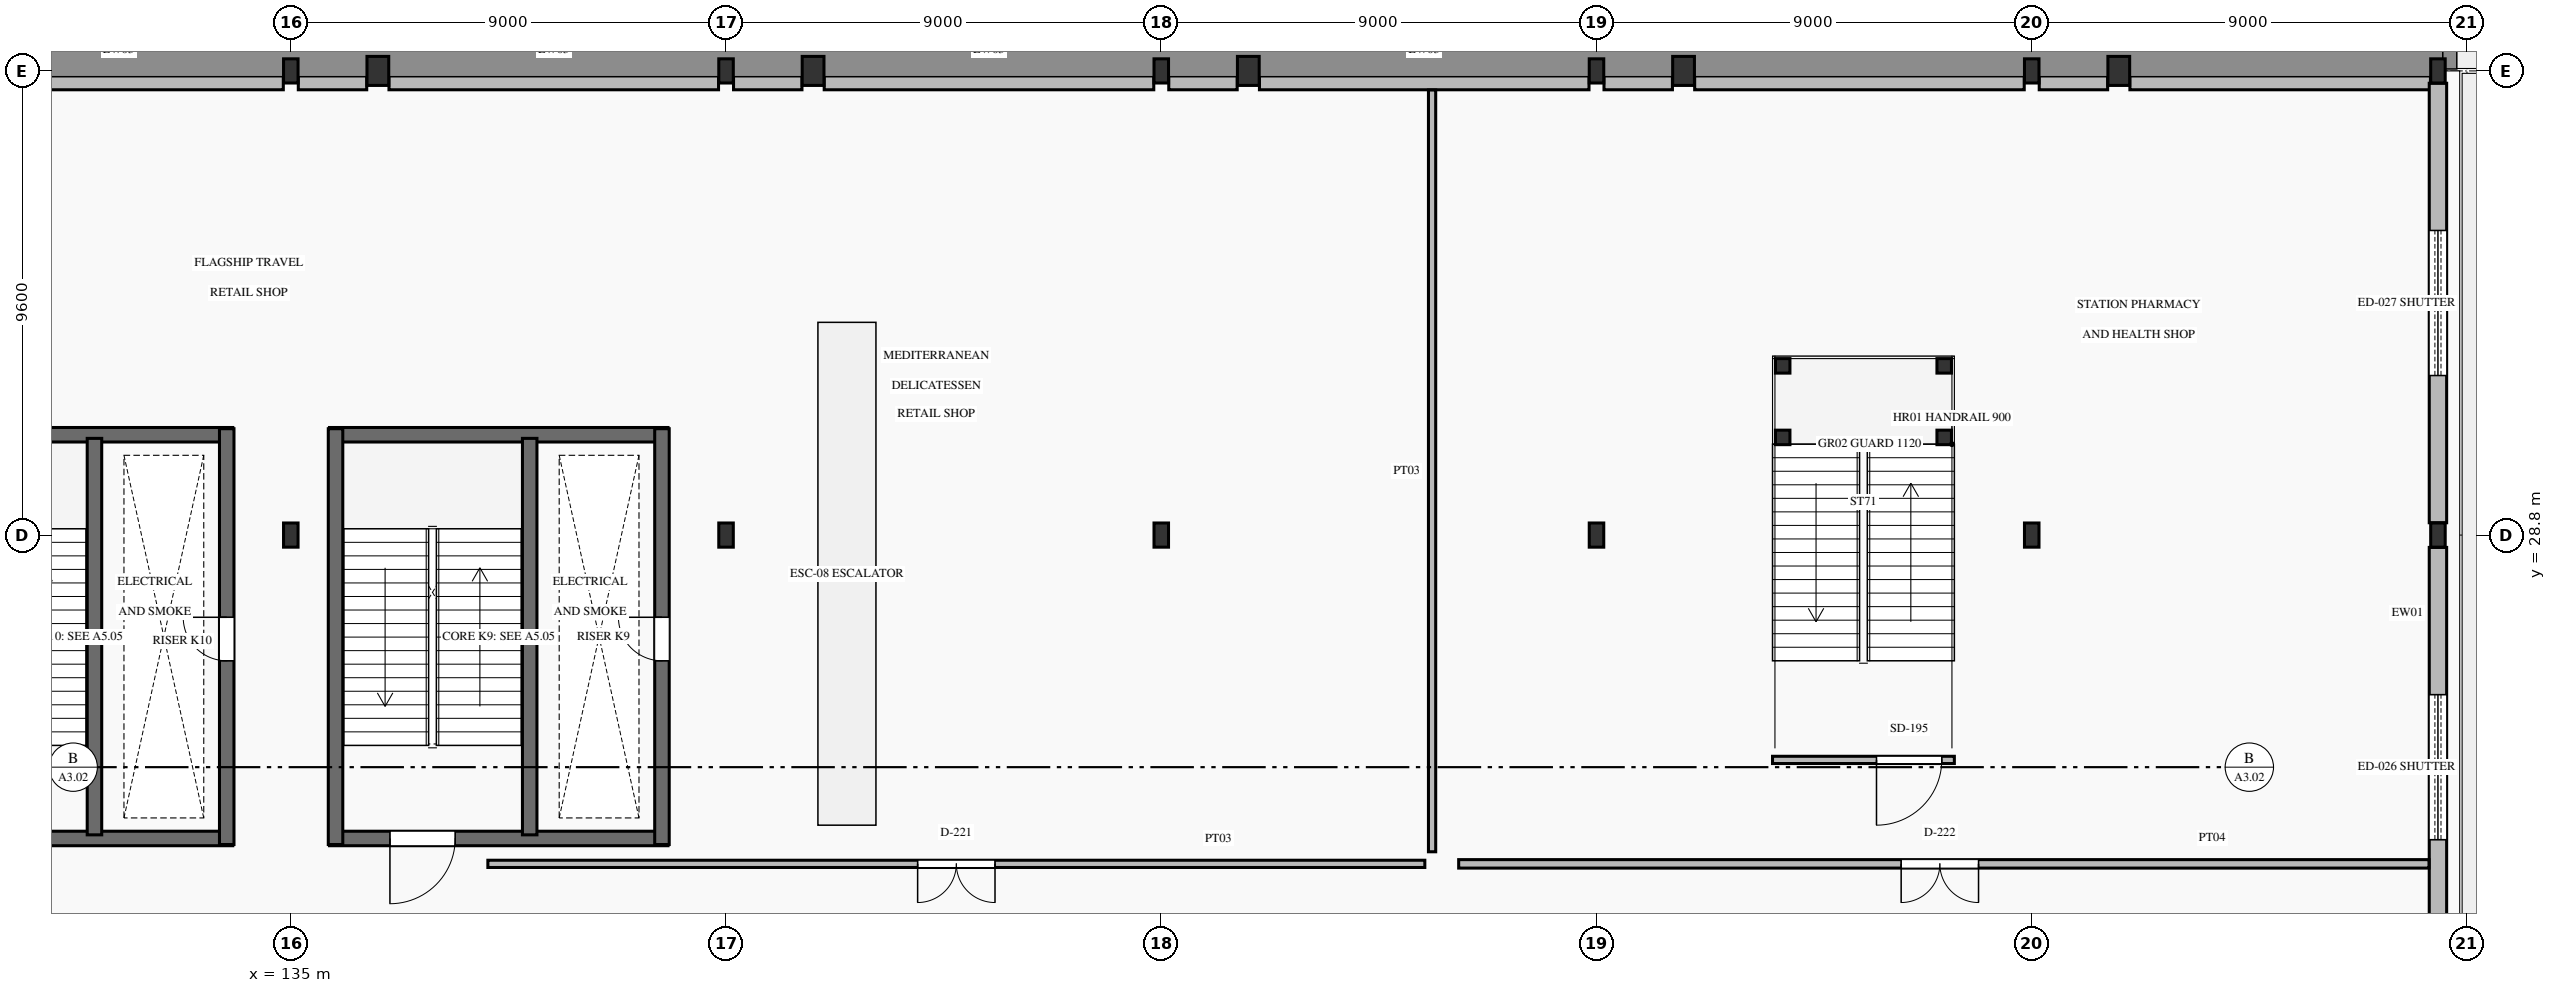
"""IFC4 building model, lengths in metres.
Left out: names, types, materials, properties, quantities, classifications, styles, units other than length and angle.
Written with IfcOpenShell. Run it as: python <this file> out.ifc"""

import sys

from ifc_helpers import new_model, si_unit, direction, frame, frame_2d, origin, origin_2d, place, context, subcontext, project, spatial, rectangle, i_section, extrude, element, fill, save


model = new_model("IFC4")
c1 = context("Model", 3, precision=1e-05, world=origin(), true_north=direction((0.0, 1.0)))
c2 = subcontext(c1, "Body", "Model", "MODEL_VIEW")
j1 = project(units=[si_unit("LENGTHUNIT", "METRE"), si_unit("PLANEANGLEUNIT", "RADIAN")], contexts=[c1])
p1 = place(None, origin())
s1 = spatial("IfcSite", under=j1, at=p1, CompositionType="ELEMENT")
p2 = place(p1, origin())
s2 = spatial("IfcBuilding", under=s1, at=p2, CompositionType="ELEMENT")
p3 = place(p2, origin())
s3 = spatial("IfcBuildingStorey", under=s2, at=p3, CompositionType="ELEMENT", Elevation=0.0)
for number, where, z_axis, x_axis in (
    (1, (135.0, 28.8, 0.0), (0.0, 0.0, 1.0), (1.0, 0.0, 0.0)),
    (2, (135.0, 38.4, 0.0), (0.0, 0.0, 1.0), (1.0, 0.0, 0.0)),
    (3, (144.0, 28.8, 0.0), (0.0, 0.0, 1.0), (1.0, 0.0, 0.0)),
    (4, (144.0, 38.4, 0.0), (0.0, 0.0, 1.0), (1.0, 0.0, 0.0)),
    (5, (153.0, 28.8, 0.0), (0.0, 0.0, 1.0), (1.0, 0.0, 0.0)),
    (6, (153.0, 38.4, 0.0), (0.0, 0.0, 1.0), (1.0, 0.0, 0.0)),
    (7, (162.0, 28.8, 0.0), (0.0, 0.0, 1.0), (1.0, 0.0, 0.0)),
    (8, (162.0, 38.4, 0.0), (0.0, 0.0, 1.0), (1.0, 0.0, 0.0)),
    (9, (171.0, 28.8, 0.0), (0.0, 0.0, 1.0), (1.0, 0.0, 0.0)),
    (10, (171.0, 38.4, 0.0), (0.0, 0.0, 1.0), (1.0, 0.0, 0.0)),
    (11, (179.4, 28.8, 0.0), (0.0, 0.0, 1.0), (1.0, 0.0, 0.0)),
    (12, (179.4, 38.4, 0.0), (0.0, 0.0, 1.0), (1.0, 0.0, 0.0)),
):
    element("IfcColumn", number, at=place(p3, frame(where, z_axis=z_axis, x_axis=x_axis)), inside=s3, PredefinedType="COLUMN", context=c2, shape_type="SweptSolid", body=[
        extrude(i_section(OverallWidth=0.3, OverallDepth=0.5, WebThickness=0.014, FlangeThickness=0.028, FilletRadius=0.027, at=origin_2d()), origin(), (0.0, 0.0, 1.0), 6.0),
    ])
for number, where, z_axis, x_axis in (
    (13, (136.8, 38.4, 0.0), (0.0, 0.0, 1.0), (1.0, 0.0, 0.0)),
    (14, (145.8, 38.4, 0.0), (0.0, 0.0, 1.0), (1.0, 0.0, 0.0)),
    (15, (154.8, 38.4, 0.0), (0.0, 0.0, 1.0), (1.0, 0.0, 0.0)),
    (16, (163.8, 38.4, 0.0), (0.0, 0.0, 1.0), (1.0, 0.0, 0.0)),
    (17, (172.8, 38.4, 0.0), (0.0, 0.0, 1.0), (1.0, 0.0, 0.0)),
):
    element("IfcColumn", number, at=place(p3, frame(where, z_axis=z_axis, x_axis=x_axis)), inside=s3, PredefinedType="PILASTER", context=c2, shape_type="SweptSolid", body=[
        extrude(rectangle(XDim=0.45, YDim=0.6, at=origin_2d()), origin(), (0.0, 0.0, 1.0), 6.0),
    ])
p4 = place(p3, frame((128.03, 38.2, 0.0), z_axis=(0.0, 0.0, 1.0), x_axis=(1.0, 0.0, 0.0)))
e18 = element("IfcWall", 18, at=p4, inside=s3, PredefinedType="SOLIDWALL", context=c2, shape_type="SweptSolid", body=[
    extrude(rectangle(XDim=6.815, YDim=0.38, at=frame_2d((3.407, 0.0))), origin(), (0.0, 0.0, 1.0), 5.49),
])
p5 = place(p3, frame((135.155, 38.2, 0.0), z_axis=(0.0, 0.0, 1.0), x_axis=(1.0, 0.0, 0.0)))
e19 = element("IfcWall", 19, at=p5, inside=s3, PredefinedType="SOLIDWALL", context=c2, shape_type="SweptSolid", body=[
    extrude(rectangle(XDim=1.415, YDim=0.38, at=frame_2d((0.708, 0.0))), origin(), (0.0, 0.0, 1.0), 5.49),
])
p6 = place(p3, frame((137.03, 38.2, 0.0), z_axis=(0.0, 0.0, 1.0), x_axis=(1.0, 0.0, 0.0)))
e20 = element("IfcWall", 20, at=p6, inside=s3, PredefinedType="SOLIDWALL", context=c2, shape_type="SweptSolid", body=[
    extrude(rectangle(XDim=6.815, YDim=0.38, at=frame_2d((3.407, 0.0))), origin(), (0.0, 0.0, 1.0), 5.49),
])
p7 = place(p3, frame((144.155, 38.2, 0.0), z_axis=(0.0, 0.0, 1.0), x_axis=(1.0, 0.0, 0.0)))
e21 = element("IfcWall", 21, at=p7, inside=s3, PredefinedType="SOLIDWALL", context=c2, shape_type="SweptSolid", body=[
    extrude(rectangle(XDim=1.415, YDim=0.38, at=frame_2d((0.708, 0.0))), origin(), (0.0, 0.0, 1.0), 5.49),
])
p8 = place(p3, frame((146.03, 38.2, 0.0), z_axis=(0.0, 0.0, 1.0), x_axis=(1.0, 0.0, 0.0)))
e22 = element("IfcWall", 22, at=p8, inside=s3, PredefinedType="SOLIDWALL", context=c2, shape_type="SweptSolid", body=[
    extrude(rectangle(XDim=6.815, YDim=0.38, at=frame_2d((3.407, 0.0))), origin(), (0.0, 0.0, 1.0), 5.49),
])
p9 = place(p3, frame((153.155, 38.2, 0.0), z_axis=(0.0, 0.0, 1.0), x_axis=(1.0, 0.0, 0.0)))
e23 = element("IfcWall", 23, at=p9, inside=s3, PredefinedType="SOLIDWALL", context=c2, shape_type="SweptSolid", body=[
    extrude(rectangle(XDim=1.415, YDim=0.38, at=frame_2d((0.708, 0.0))), origin(), (0.0, 0.0, 1.0), 5.49),
])
p10 = place(p3, frame((155.03, 38.2, 0.0), z_axis=(0.0, 0.0, 1.0), x_axis=(1.0, 0.0, 0.0)))
e24 = element("IfcWall", 24, at=p10, inside=s3, PredefinedType="SOLIDWALL", context=c2, shape_type="SweptSolid", body=[
    extrude(rectangle(XDim=6.815, YDim=0.38, at=frame_2d((3.407, 0.0))), origin(), (0.0, 0.0, 1.0), 5.49),
])
p11 = place(p3, frame((162.155, 38.2, 0.0), z_axis=(0.0, 0.0, 1.0), x_axis=(1.0, 0.0, 0.0)))
e25 = element("IfcWall", 25, at=p11, inside=s3, PredefinedType="SOLIDWALL", context=c2, shape_type="SweptSolid", body=[
    extrude(rectangle(XDim=1.415, YDim=0.38, at=frame_2d((0.708, 0.0))), origin(), (0.0, 0.0, 1.0), 5.49),
])
p12 = place(p3, frame((164.03, 38.2, 0.0), z_axis=(0.0, 0.0, 1.0), x_axis=(1.0, 0.0, 0.0)))
e26 = element("IfcWall", 26, at=p12, inside=s3, PredefinedType="SOLIDWALL", context=c2, shape_type="SweptSolid", body=[
    extrude(rectangle(XDim=6.815, YDim=0.38, at=frame_2d((3.407, 0.0))), origin(), (0.0, 0.0, 1.0), 5.49),
])
p13 = place(p3, frame((171.155, 38.2, 0.0), z_axis=(0.0, 0.0, 1.0), x_axis=(1.0, 0.0, 0.0)))
e27 = element("IfcWall", 27, at=p13, inside=s3, PredefinedType="SOLIDWALL", context=c2, shape_type="SweptSolid", body=[
    extrude(rectangle(XDim=1.415, YDim=0.38, at=frame_2d((0.708, 0.0))), origin(), (0.0, 0.0, 1.0), 5.49),
])
p14 = place(p3, frame((173.03, 38.2, 0.0), z_axis=(0.0, 0.0, 1.0), x_axis=(1.0, 0.0, 0.0)))
e28 = element("IfcWall", 28, at=p14, inside=s3, PredefinedType="SOLIDWALL", context=c2, shape_type="SweptSolid", body=[
    extrude(rectangle(XDim=6.215, YDim=0.38, at=frame_2d((3.107, 0.0))), origin(), (0.0, 0.0, 1.0), 5.49),
])
p15 = place(p3, frame((179.4, 19.455, 0.0), z_axis=(0.0, 0.0, 1.0), x_axis=(0.0, 1.0, 0.0)))
e29 = element("IfcWall", 29, at=p15, inside=s3, PredefinedType="SOLIDWALL", context=c2, shape_type="SweptSolid", body=[
    extrude(rectangle(XDim=9.09, YDim=0.36, at=frame_2d((4.545, 0.0))), origin(), (0.0, 0.0, 1.0), 5.48),
])
p16 = place(p15, frame((3.045, 0.0, 0.0)))
e30 = element("IfcOpeningElement", 30, at=p16, cuts=e29, PredefinedType="OPENING", context=c2, shape_type="SweptSolid", body=[
    extrude(rectangle(XDim=3.0, YDim=2.8, at=frame_2d((1.5, 1.4))), frame((0.0, 0.195, 0.0), z_axis=(0.0, -1.0, 0.0), x_axis=(1.0, 0.0, 0.0)), (0.0, 0.0, 1.0), 0.39),
])
p17 = place(p3, frame((179.4, 29.055, 0.0), z_axis=(0.0, 0.0, 1.0), x_axis=(0.0, 1.0, 0.0)))
e31 = element("IfcWall", 31, at=p17, inside=s3, PredefinedType="SOLIDWALL", context=c2, shape_type="SweptSolid", body=[
    extrude(rectangle(XDim=9.09, YDim=0.36, at=frame_2d((4.545, 0.0))), origin(), (0.0, 0.0, 1.0), 5.48),
])
p18 = place(p17, frame((3.045, 0.0, 0.0)))
e32 = element("IfcOpeningElement", 32, at=p18, cuts=e31, PredefinedType="OPENING", context=c2, shape_type="SweptSolid", body=[
    extrude(rectangle(XDim=3.0, YDim=2.8, at=frame_2d((1.5, 1.4))), frame((0.0, 0.195, 0.0), z_axis=(0.0, -1.0, 0.0), x_axis=(1.0, 0.0, 0.0)), (0.0, 0.0, 1.0), 0.39),
])
p19 = place(p3, frame((135.8, 22.525, 0.0), z_axis=(0.0, 0.0, 1.0), x_axis=(1.0, 0.0, 0.0)))
e33 = element("IfcWall", 33, at=p19, inside=s3, PredefinedType="SHEAR", context=c2, shape_type="SweptSolid", body=[
    extrude(rectangle(XDim=7.0, YDim=0.3, at=frame_2d((3.5, 0.0))), origin(), (0.0, 0.0, 1.0), 6.0),
])
p20 = place(p19, frame((1.25, 0.0, 0.0)))
e34 = element("IfcOpeningElement", 34, at=p20, cuts=e33, PredefinedType="OPENING", context=c2, shape_type="SweptSolid", body=[
    extrude(rectangle(XDim=1.35, YDim=2.2, at=frame_2d((0.675, 1.1))), frame((0.0, 0.165, 0.0), z_axis=(0.0, -1.0, 0.0), x_axis=(1.0, 0.0, 0.0)), (0.0, 0.0, 1.0), 0.33),
])
p21 = place(p3, frame((135.8, 30.875, 0.0), z_axis=(0.0, 0.0, 1.0), x_axis=(1.0, 0.0, 0.0)))
e35 = element("IfcWall", 35, at=p21, inside=s3, PredefinedType="SHEAR", context=c2, shape_type="SweptSolid", body=[
    extrude(rectangle(XDim=7.0, YDim=0.3, at=frame_2d((3.5, 0.0))), origin(), (0.0, 0.0, 1.0), 6.0),
])
p22 = place(p3, frame((135.925, 22.4, 0.0), z_axis=(0.0, 0.0, 1.0), x_axis=(0.0, 1.0, 0.0)))
e36 = element("IfcWall", 36, at=p22, inside=s3, PredefinedType="SHEAR", context=c2, shape_type="SweptSolid", body=[
    extrude(rectangle(XDim=8.6, YDim=0.3, at=frame_2d((4.3, 0.0))), origin(), (0.0, 0.0, 1.0), 6.0),
])
p23 = place(p3, frame((142.675, 22.4, 0.0), z_axis=(0.0, 0.0, 1.0), x_axis=(0.0, 1.0, 0.0)))
e37 = element("IfcWall", 37, at=p23, inside=s3, PredefinedType="SHEAR", context=c2, shape_type="SweptSolid", body=[
    extrude(rectangle(XDim=8.6, YDim=0.3, at=frame_2d((4.3, 0.0))), origin(), (0.0, 0.0, 1.0), 6.0),
])
p24 = place(p23, frame((3.8, 0.0, 0.0)))
e38 = element("IfcOpeningElement", 38, at=p24, cuts=e37, PredefinedType="OPENING", context=c2, shape_type="SweptSolid", body=[
    extrude(rectangle(XDim=0.9, YDim=2.05, at=frame_2d((0.45, 1.025))), frame((0.0, 0.165, 0.0), z_axis=(0.0, -1.0, 0.0), x_axis=(1.0, 0.0, 0.0)), (0.0, 0.0, 1.0), 0.33),
])
p25 = place(p3, frame((139.94, 22.6, 0.0), z_axis=(0.0, 0.0, 1.0), x_axis=(0.0, 1.0, 0.0)))
e39 = element("IfcWall", 39, at=p25, inside=s3, PredefinedType="SHEAR", context=c2, shape_type="SweptSolid", body=[
    extrude(rectangle(XDim=8.2, YDim=0.3, at=frame_2d((4.1, 0.0))), origin(), (0.0, 0.0, 1.0), 6.0),
])
p26 = place(p3, frame((126.8, 22.525, 0.0), z_axis=(0.0, 0.0, 1.0), x_axis=(1.0, 0.0, 0.0)))
e40 = element("IfcWall", 40, at=p26, inside=s3, PredefinedType="SHEAR", context=c2, shape_type="SweptSolid", body=[
    extrude(rectangle(XDim=7.0, YDim=0.3, at=frame_2d((3.5, 0.0))), origin(), (0.0, 0.0, 1.0), 6.0),
])
p27 = place(p26, frame((1.25, 0.0, 0.0)))
e41 = element("IfcOpeningElement", 41, at=p27, cuts=e40, PredefinedType="OPENING", context=c2, shape_type="SweptSolid", body=[
    extrude(rectangle(XDim=1.35, YDim=2.2, at=frame_2d((0.675, 1.1))), frame((0.0, 0.165, 0.0), z_axis=(0.0, -1.0, 0.0), x_axis=(1.0, 0.0, 0.0)), (0.0, 0.0, 1.0), 0.33),
])
p28 = place(p3, frame((126.8, 30.875, 0.0), z_axis=(0.0, 0.0, 1.0), x_axis=(1.0, 0.0, 0.0)))
e42 = element("IfcWall", 42, at=p28, inside=s3, PredefinedType="SHEAR", context=c2, shape_type="SweptSolid", body=[
    extrude(rectangle(XDim=7.0, YDim=0.3, at=frame_2d((3.5, 0.0))), origin(), (0.0, 0.0, 1.0), 6.0),
])
p29 = place(p3, frame((133.675, 22.4, 0.0), z_axis=(0.0, 0.0, 1.0), x_axis=(0.0, 1.0, 0.0)))
e43 = element("IfcWall", 43, at=p29, inside=s3, PredefinedType="SHEAR", context=c2, shape_type="SweptSolid", body=[
    extrude(rectangle(XDim=8.6, YDim=0.3, at=frame_2d((4.3, 0.0))), origin(), (0.0, 0.0, 1.0), 6.0),
])
p30 = place(p29, frame((3.8, 0.0, 0.0)))
e44 = element("IfcOpeningElement", 44, at=p30, cuts=e43, PredefinedType="OPENING", context=c2, shape_type="SweptSolid", body=[
    extrude(rectangle(XDim=0.9, YDim=2.05, at=frame_2d((0.45, 1.025))), frame((0.0, 0.165, 0.0), z_axis=(0.0, -1.0, 0.0), x_axis=(1.0, 0.0, 0.0)), (0.0, 0.0, 1.0), 0.33),
])
p31 = place(p3, frame((130.94, 22.6, 0.0), z_axis=(0.0, 0.0, 1.0), x_axis=(0.0, 1.0, 0.0)))
e45 = element("IfcWall", 45, at=p31, inside=s3, PredefinedType="SHEAR", context=c2, shape_type="SweptSolid", body=[
    extrude(rectangle(XDim=8.2, YDim=0.3, at=frame_2d((4.1, 0.0))), origin(), (0.0, 0.0, 1.0), 6.0),
])
for number, where, z_axis, x_axis in (
    (46, (165.85, 32.3, 0.0), (0.0, 0.0, 1.0), (1.0, 0.0, 0.0)),
    (47, (165.85, 30.82, 0.0), (0.0, 0.0, 1.0), (1.0, 0.0, 0.0)),
    (48, (169.19, 32.3, 0.0), (0.0, 0.0, 1.0), (1.0, 0.0, 0.0)),
    (49, (169.19, 30.82, 0.0), (0.0, 0.0, 1.0), (1.0, 0.0, 0.0)),
):
    element("IfcColumn", number, at=place(p3, frame(where, z_axis=z_axis, x_axis=x_axis)), inside=s3, PredefinedType="COLUMN", context=c2, shape_type="SweptSolid", body=[
        extrude(i_section(OverallWidth=0.3, OverallDepth=0.3, WebThickness=0.011, FlangeThickness=0.019, FilletRadius=0.027, at=origin_2d()), origin(), (0.0, 0.0, 1.0), 2.8),
    ])
p32 = place(p3, frame((165.64, 24.15, 0.0), z_axis=(0.0, 0.0, 1.0), x_axis=(1.0, 0.0, 0.0)))
e50 = element("IfcWall", 50, at=p32, inside=s3, PredefinedType="PARTITIONING", context=c2, shape_type="SweptSolid", body=[
    extrude(rectangle(XDim=3.76, YDim=0.15, at=frame_2d((1.88, 0.0))), origin(), (0.0, 0.0, 1.0), 5.53),
])
p33 = place(p32, frame((2.15, 0.0, 0.0)))
e51 = element("IfcOpeningElement", 51, at=p33, cuts=e50, PredefinedType="OPENING", context=c2, shape_type="SweptSolid", body=[
    extrude(rectangle(XDim=1.35, YDim=2.2, at=frame_2d((0.675, 1.1))), frame((0.0, 0.09, 0.0), z_axis=(0.0, -1.0, 0.0), x_axis=(1.0, 0.0, 0.0)), (0.0, 0.0, 1.0), 0.18),
])
p34 = place(p3, frame((139.075, 22.0, 0.0), z_axis=(0.0, 0.0, 1.0), x_axis=(1.0, 0.0, 0.0)))
e52 = element("IfcWall", 52, at=p34, inside=s3, PredefinedType="PARTITIONING", context=c2, shape_type="SweptSolid", body=[
    extrude(rectangle(XDim=19.375, YDim=0.15, at=frame_2d((9.688, 0.0))), origin(), (0.0, 0.0, 1.0), 5.72),
])
p35 = place(p34, frame((8.887, 0.0, 0.0)))
e53 = element("IfcOpeningElement", 53, at=p35, cuts=e52, PredefinedType="OPENING", context=c2, shape_type="SweptSolid", body=[
    extrude(rectangle(XDim=1.6, YDim=2.25, at=frame_2d((0.8, 1.125))), frame((0.0, 0.09, 0.0), z_axis=(0.0, -1.0, 0.0), x_axis=(1.0, 0.0, 0.0)), (0.0, 0.0, 1.0), 0.18),
])
p36 = place(p3, frame((159.15, 22.0, 0.0), z_axis=(0.0, 0.0, 1.0), x_axis=(1.0, 0.0, 0.0)))
e54 = element("IfcWall", 54, at=p36, inside=s3, PredefinedType="PARTITIONING", context=c2, shape_type="SweptSolid", body=[
    extrude(rectangle(XDim=20.065, YDim=0.175, at=frame_2d((10.033, 0.0))), origin(), (0.0, 0.0, 1.0), 5.72),
])
p37 = place(p36, frame((9.15, 0.0, 0.0)))
e55 = element("IfcOpeningElement", 55, at=p37, cuts=e54, PredefinedType="OPENING", context=c2, shape_type="SweptSolid", body=[
    extrude(rectangle(XDim=1.6, YDim=2.25, at=frame_2d((0.8, 1.125))), frame((0.0, 0.103, 0.0), z_axis=(0.0, -1.0, 0.0), x_axis=(1.0, 0.0, 0.0)), (0.0, 0.0, 1.0), 0.205),
])
p38 = place(p3, frame((158.6, 22.25, 0.0), z_axis=(0.0, 0.0, 1.0), x_axis=(0.0, 1.0, 0.0)))
e56 = element("IfcWall", 56, at=p38, inside=s3, PredefinedType="PARTITIONING", context=c2, shape_type="SweptSolid", body=[
    extrude(rectangle(XDim=15.755, YDim=0.15, at=frame_2d((7.877, 0.0))), origin(), (0.0, 0.0, 1.0), 5.72),
])
p39 = place(p16, frame((3.0, 0.0, 0.0), z_axis=(0.0, 0.0, 1.0), x_axis=(-1.0, 0.0, 0.0)))
e57 = element("IfcDoor", 57, at=p39, inside=s3, OperationType="ROLLINGUP", PredefinedType="GATE", context=c2, shape_type="SweptSolid", body=[
    extrude(rectangle(XDim=3.0, YDim=2.8, at=frame_2d((1.5, 1.4))), frame((0.0, 0.025, 0.0), z_axis=(0.0, -1.0, 0.0), x_axis=(1.0, 0.0, 0.0)), (0.0, 0.0, 1.0), 0.05),
])
fill(e30, e57)
p40 = place(p18, frame((3.0, 0.0, 0.0), z_axis=(0.0, 0.0, 1.0), x_axis=(-1.0, 0.0, 0.0)))
e58 = element("IfcDoor", 58, at=p40, inside=s3, OperationType="ROLLINGUP", PredefinedType="GATE", context=c2, shape_type="SweptSolid", body=[
    extrude(rectangle(XDim=3.0, YDim=2.8, at=frame_2d((1.5, 1.4))), frame((0.0, 0.025, 0.0), z_axis=(0.0, -1.0, 0.0), x_axis=(1.0, 0.0, 0.0)), (0.0, 0.0, 1.0), 0.05),
])
fill(e32, e58)
p41 = place(p20, frame((1.35, 0.0, 0.0), z_axis=(0.0, 0.0, 1.0), x_axis=(-1.0, 0.0, 0.0)))
e59 = element("IfcDoor", 59, at=p41, inside=s3, OperationType="SINGLE_SWING_LEFT", PredefinedType="DOOR", context=c2, shape_type="SweptSolid", body=[
    extrude(rectangle(XDim=1.35, YDim=2.2, at=frame_2d((0.675, 1.1))), frame((0.0, 0.025, 0.0), z_axis=(0.0, -1.0, 0.0), x_axis=(1.0, 0.0, 0.0)), (0.0, 0.0, 1.0), 0.05),
])
fill(e34, e59)
p42 = place(p24, origin())
e60 = element("IfcDoor", 60, at=p42, inside=s3, OperationType="SINGLE_SWING_RIGHT", PredefinedType="DOOR", context=c2, shape_type="SweptSolid", body=[
    extrude(rectangle(XDim=0.9, YDim=2.05, at=frame_2d((0.45, 1.025))), frame((0.0, 0.025, 0.0), z_axis=(0.0, -1.0, 0.0), x_axis=(1.0, 0.0, 0.0)), (0.0, 0.0, 1.0), 0.05),
])
fill(e38, e60)
p43 = place(p30, origin())
e61 = element("IfcDoor", 61, at=p43, inside=s3, OperationType="SINGLE_SWING_RIGHT", PredefinedType="DOOR", context=c2, shape_type="SweptSolid", body=[
    extrude(rectangle(XDim=0.9, YDim=2.05, at=frame_2d((0.45, 1.025))), frame((0.0, 0.025, 0.0), z_axis=(0.0, -1.0, 0.0), x_axis=(1.0, 0.0, 0.0)), (0.0, 0.0, 1.0), 0.05),
])
fill(e44, e61)
p44 = place(p33, frame((1.35, 0.0, 0.0), z_axis=(0.0, 0.0, 1.0), x_axis=(-1.0, 0.0, 0.0)))
e62 = element("IfcDoor", 62, at=p44, inside=s3, OperationType="SINGLE_SWING_LEFT", PredefinedType="DOOR", context=c2, shape_type="SweptSolid", body=[
    extrude(rectangle(XDim=1.35, YDim=2.2, at=frame_2d((0.675, 1.1))), frame((0.0, 0.025, 0.0), z_axis=(0.0, -1.0, 0.0), x_axis=(1.0, 0.0, 0.0)), (0.0, 0.0, 1.0), 0.05),
])
fill(e51, e62)
p45 = place(p35, frame((1.6, 0.0, 0.0), z_axis=(0.0, 0.0, 1.0), x_axis=(-1.0, 0.0, 0.0)))
e63 = element("IfcDoor", 63, at=p45, inside=s3, OperationType="DOUBLE_DOOR_SINGLE_SWING", PredefinedType="DOOR", context=c2, shape_type="SweptSolid", body=[
    extrude(rectangle(XDim=1.6, YDim=2.25, at=frame_2d((0.8, 1.125))), frame((0.0, 0.025, 0.0), z_axis=(0.0, -1.0, 0.0), x_axis=(1.0, 0.0, 0.0)), (0.0, 0.0, 1.0), 0.05),
])
fill(e53, e63)
p46 = place(p37, frame((1.6, 0.0, 0.0), z_axis=(0.0, 0.0, 1.0), x_axis=(-1.0, 0.0, 0.0)))
e64 = element("IfcDoor", 64, at=p46, inside=s3, OperationType="DOUBLE_DOOR_SINGLE_SWING", PredefinedType="DOOR", context=c2, shape_type="SweptSolid", body=[
    extrude(rectangle(XDim=1.6, YDim=2.25, at=frame_2d((0.8, 1.125))), frame((0.0, 0.025, 0.0), z_axis=(0.0, -1.0, 0.0), x_axis=(1.0, 0.0, 0.0)), (0.0, 0.0, 1.0), 0.05),
])
fill(e55, e64)
save(model, sys.argv[1])
